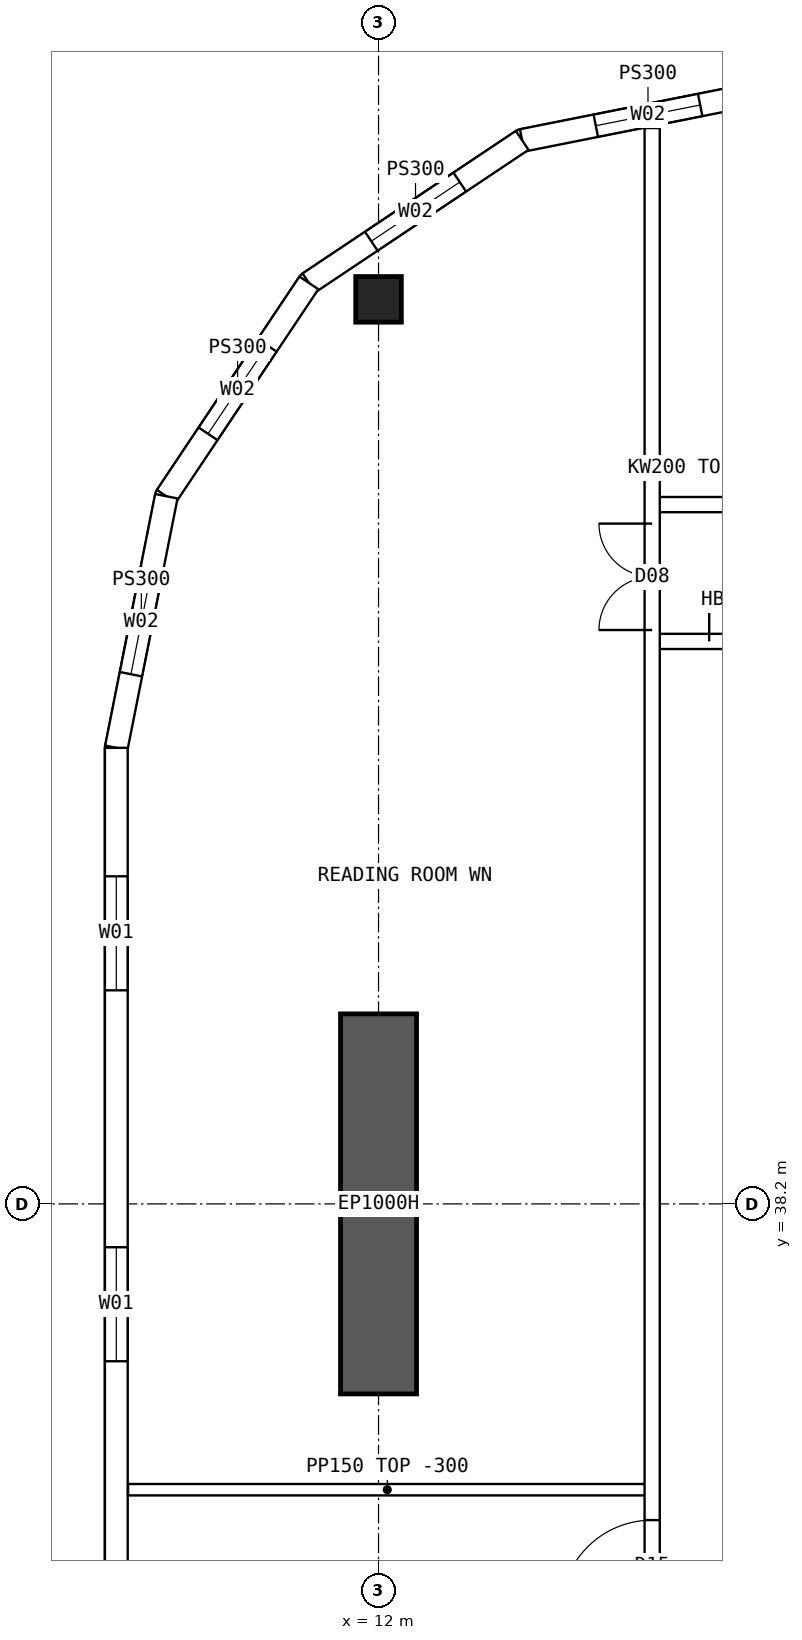
"""IFC4 building model, lengths in metres.
Left out: names, types, materials, properties, quantities, classifications, styles, units other than length and angle.
Written with IfcOpenShell. Run it as: python <this file> out.ifc"""

import sys

from ifc_helpers import new_model, si_unit, direction, frame, frame_2d, origin, origin_2d, place, context, subcontext, project, spatial, polyline, rectangle, hollow_rectangle, outline, extrude, element, fill, save


model = new_model("IFC4")
c1 = context("Model", 3, precision=1e-05, world=origin(), true_north=direction((0.0, 1.0)))
c2 = subcontext(c1, "Body", "Model", "MODEL_VIEW")
j1 = project(units=[si_unit("LENGTHUNIT", "METRE"), si_unit("PLANEANGLEUNIT", "RADIAN")], contexts=[c1])
p1 = place(None, origin())
s1 = spatial("IfcSite", under=j1, at=p1, CompositionType="ELEMENT")
p2 = place(p1, origin())
s2 = spatial("IfcBuilding", under=s1, at=p2, CompositionType="ELEMENT")
p3 = place(p2, frame((0.0, 0.0, 254.05)))
s3 = spatial("IfcBuildingStorey", under=s2, at=p3, CompositionType="ELEMENT", Elevation=254.05)
p4 = place(p3, frame((12.0, 50.1, 0.0), z_axis=(0.0, 0.0, 1.0), x_axis=(1.0, 0.0, 0.0)))
e1 = element("IfcColumn", 1, at=p4, inside=s3, PredefinedType="COLUMN", context=c2, shape_type="SweptSolid", body=[
    extrude(hollow_rectangle(XDim=0.6, YDim=0.6, WallThickness=0.06, at=origin_2d()), origin(), (0.0, 0.0, 1.0), 3.75),
])
p5 = place(p3, frame((12.0, 35.7, 0.0), z_axis=(0.0, 0.0, 1.0), x_axis=(0.0, 1.0, 0.0)))
e2 = element("IfcWall", 2, at=p5, inside=s3, PredefinedType="SHEAR", context=c2, shape_type="SweptSolid", body=[
    extrude(rectangle(XDim=5.0, YDim=1.0, at=frame_2d((2.5, 0.0))), origin(), (0.0, 0.0, 1.0), 3.75),
])
p6 = place(p3, frame((8.55, 44.2, 0.0), z_axis=(0.0, 0.0, 1.0), x_axis=(0.0, -1.0, 0.0)))
e3 = element("IfcWall", 3, at=p6, inside=s3, PredefinedType="SOLIDWALL", context=c2, shape_type="SweptSolid", body=[
    extrude(outline(polyline([(-0.015, -0.15), (24.415, -0.15), (24.385, 0.15), (0.015, 0.15), (-0.015, -0.15)])), origin(), (0.0, 0.0, 1.0), 3.45),
])
p7 = place(p6, frame((1.69, 0.0, 0.9)))
e4 = element("IfcOpeningElement", 4, at=p7, cuts=e3, PredefinedType="OPENING", context=c2, shape_type="SweptSolid", body=[
    extrude(rectangle(XDim=1.5, YDim=2.0, at=frame_2d((0.75, 1.0))), frame((0.0, 0.16, 0.0), z_axis=(0.0, -1.0, 0.0), x_axis=(1.0, 0.0, 0.0)), (0.0, 0.0, 1.0), 0.32),
])
p8 = place(p6, frame((6.57, 0.0, 0.9)))
e5 = element("IfcOpeningElement", 5, at=p8, cuts=e3, PredefinedType="OPENING", context=c2, shape_type="SweptSolid", body=[
    extrude(rectangle(XDim=1.5, YDim=2.0, at=frame_2d((0.75, 1.0))), frame((0.0, 0.16, 0.0), z_axis=(0.0, -1.0, 0.0), x_axis=(1.0, 0.0, 0.0)), (0.0, 0.0, 1.0), 0.32),
])
p9 = place(p6, frame((11.45, 0.0, 0.9)))
e6 = element("IfcOpeningElement", 6, at=p9, cuts=e3, PredefinedType="OPENING", context=c2, shape_type="SweptSolid", body=[
    extrude(rectangle(XDim=1.5, YDim=2.0, at=frame_2d((0.75, 1.0))), frame((0.0, 0.16, 0.0), z_axis=(0.0, -1.0, 0.0), x_axis=(1.0, 0.0, 0.0)), (0.0, 0.0, 1.0), 0.32),
])
p10 = place(p6, frame((16.33, 0.0, 0.9)))
e7 = element("IfcOpeningElement", 7, at=p10, cuts=e3, PredefinedType="OPENING", context=c2, shape_type="SweptSolid", body=[
    extrude(rectangle(XDim=1.5, YDim=2.0, at=frame_2d((0.75, 1.0))), frame((0.0, 0.16, 0.0), z_axis=(0.0, -1.0, 0.0), x_axis=(1.0, 0.0, 0.0)), (0.0, 0.0, 1.0), 0.32),
])
p11 = place(p6, frame((21.21, 0.0, 0.9)))
e8 = element("IfcOpeningElement", 8, at=p11, cuts=e3, PredefinedType="OPENING", context=c2, shape_type="SweptSolid", body=[
    extrude(rectangle(XDim=1.5, YDim=2.0, at=frame_2d((0.75, 1.0))), frame((0.0, 0.16, 0.0), z_axis=(0.0, -1.0, 0.0), x_axis=(1.0, 0.0, 0.0)), (0.0, 0.0, 1.0), 0.32),
])
p12 = place(p3, frame((17.2, 52.85, 0.0), z_axis=(0.0, 0.0, 1.0), x_axis=(-0.98078325777, -0.195100490205, 0.0)))
e9 = element("IfcWall", 9, at=p12, inside=s3, PredefinedType="SOLIDWALL", context=c2, shape_type="SweptSolid", body=[
    extrude(outline(polyline([(-0.03, -0.15), (3.405, -0.15), (3.345, 0.15), (0.03, 0.15), (-0.03, -0.15)])), origin(), (0.0, 0.0, 1.0), 3.45),
])
p13 = place(p12, frame((0.988, 0.0, 0.9)))
e10 = element("IfcOpeningElement", 10, at=p13, cuts=e9, PredefinedType="OPENING", context=c2, shape_type="SweptSolid", body=[
    extrude(rectangle(XDim=1.4, YDim=1.8, at=frame_2d((0.7, 0.9))), frame((0.0, 0.16, 0.0), z_axis=(0.0, -1.0, 0.0), x_axis=(1.0, 0.0, 0.0)), (0.0, 0.0, 1.0), 0.32),
])
p14 = place(p3, frame((13.89, 52.192, 0.0), z_axis=(0.0, 0.0, 1.0), x_axis=(-0.831460037396, -0.555584562613, 0.0)))
e11 = element("IfcWall", 11, at=p14, inside=s3, PredefinedType="SOLIDWALL", context=c2, shape_type="SweptSolid", body=[
    extrude(outline(polyline([(-0.03, -0.15), (3.405, -0.15), (3.345, 0.15), (0.03, 0.15), (-0.03, -0.15)])), origin(), (0.0, 0.0, 1.0), 3.45),
])
p15 = place(p14, frame((0.988, 0.0, 0.9)))
e12 = element("IfcOpeningElement", 12, at=p15, cuts=e11, PredefinedType="OPENING", context=c2, shape_type="SweptSolid", body=[
    extrude(rectangle(XDim=1.4, YDim=1.8, at=frame_2d((0.7, 0.9))), frame((0.0, 0.16, 0.0), z_axis=(0.0, -1.0, 0.0), x_axis=(1.0, 0.0, 0.0)), (0.0, 0.0, 1.0), 0.32),
])
p16 = place(p3, frame((11.083, 50.316, 0.0), z_axis=(0.0, 0.0, 1.0), x_axis=(-0.555567969291, -0.831471124873, 0.0)))
e13 = element("IfcWall", 13, at=p16, inside=s3, PredefinedType="SOLIDWALL", context=c2, shape_type="SweptSolid", body=[
    extrude(outline(polyline([(-0.03, -0.15), (3.405, -0.15), (3.345, 0.15), (0.03, 0.15), (-0.03, -0.15)])), origin(), (0.0, 0.0, 1.0), 3.45),
])
p17 = place(p16, frame((0.988, 0.0, 0.9)))
e14 = element("IfcOpeningElement", 14, at=p17, cuts=e13, PredefinedType="OPENING", context=c2, shape_type="SweptSolid", body=[
    extrude(rectangle(XDim=1.4, YDim=1.8, at=frame_2d((0.7, 0.9))), frame((0.0, 0.16, 0.0), z_axis=(0.0, -1.0, 0.0), x_axis=(1.0, 0.0, 0.0)), (0.0, 0.0, 1.0), 0.32),
])
p18 = place(p3, frame((9.208, 47.51, 0.0), z_axis=(0.0, 0.0, 1.0), x_axis=(-0.19508664885, -0.980786011034, 0.0)))
e15 = element("IfcWall", 15, at=p18, inside=s3, PredefinedType="SOLIDWALL", context=c2, shape_type="SweptSolid", body=[
    extrude(outline(polyline([(-0.03, -0.15), (3.39, -0.15), (3.36, 0.15), (0.03, 0.15), (-0.03, -0.15)])), origin(), (0.0, 0.0, 1.0), 3.45),
])
p19 = place(p18, frame((0.988, 0.0, 0.9)))
e16 = element("IfcOpeningElement", 16, at=p19, cuts=e15, PredefinedType="OPENING", context=c2, shape_type="SweptSolid", body=[
    extrude(rectangle(XDim=1.4, YDim=1.8, at=frame_2d((0.7, 0.9))), frame((0.0, 0.16, 0.0), z_axis=(0.0, -1.0, 0.0), x_axis=(1.0, 0.0, 0.0)), (0.0, 0.0, 1.0), 0.32),
])
p20 = place(p3, frame((15.6, 47.4, 0.0), z_axis=(0.0, 0.0, 1.0), x_axis=(1.0, 0.0, 0.0)))
e17 = element("IfcWall", 17, at=p20, inside=s3, PredefinedType="SOLIDWALL", context=c2, shape_type="SweptSolid", body=[
    extrude(rectangle(XDim=2.05, YDim=0.2, at=frame_2d((1.025, 0.0))), origin(), (0.0, 0.0, 1.0), 3.45),
])
p21 = place(p20, frame((0.95, 0.0, 0.0)))
e18 = element("IfcOpeningElement", 18, at=p21, cuts=e17, PredefinedType="OPENING", context=c2, shape_type="SweptSolid", body=[
    extrude(rectangle(XDim=0.9, YDim=2.1, at=frame_2d((0.45, 1.05))), frame((0.0, 0.11, 0.0), z_axis=(0.0, -1.0, 0.0), x_axis=(1.0, 0.0, 0.0)), (0.0, 0.0, 1.0), 0.22),
])
p22 = place(p3, frame((15.6, 45.6, 0.0), z_axis=(0.0, 0.0, 1.0), x_axis=(1.0, 0.0, 0.0)))
e19 = element("IfcWall", 19, at=p22, inside=s3, PredefinedType="SOLIDWALL", context=c2, shape_type="SweptSolid", body=[
    extrude(rectangle(XDim=2.05, YDim=0.2, at=frame_2d((1.025, 0.0))), origin(), (0.0, 0.0, 1.0), 3.45),
])
p23 = place(p22, frame((0.75, 0.0, 0.0)))
e20 = element("IfcOpeningElement", 20, at=p23, cuts=e19, PredefinedType="OPENING", context=c2, shape_type="SweptSolid", body=[
    extrude(rectangle(XDim=1.2, YDim=2.1, at=frame_2d((0.6, 1.05))), frame((0.0, 0.11, 0.0), z_axis=(0.0, -1.0, 0.0), x_axis=(1.0, 0.0, 0.0)), (0.0, 0.0, 1.0), 0.22),
])
p24 = place(p3, frame((15.6, 11.646, 0.0), z_axis=(0.0, 0.0, 1.0), x_axis=(0.0, 1.0, 0.0)))
e21 = element("IfcWall", 21, at=p24, inside=s3, PredefinedType="SOLIDWALL", context=c2, shape_type="SweptSolid", body=[
    extrude(rectangle(XDim=40.708, YDim=0.2, at=frame_2d((20.354, 0.0))), origin(), (0.0, 0.0, 1.0), 3.45),
])
p25 = place(p24, frame((21.194, 0.0, 0.0)))
e22 = element("IfcOpeningElement", 22, at=p25, cuts=e21, PredefinedType="OPENING", context=c2, shape_type="SweptSolid", body=[
    extrude(rectangle(XDim=1.2, YDim=2.1, at=frame_2d((0.6, 1.05))), frame((0.0, 0.11, 0.0), z_axis=(0.0, -1.0, 0.0), x_axis=(1.0, 0.0, 0.0)), (0.0, 0.0, 1.0), 0.22),
])
p26 = place(p24, frame((5.104, 0.0, 0.0)))
e23 = element("IfcOpeningElement", 23, at=p26, cuts=e21, PredefinedType="OPENING", context=c2, shape_type="SweptSolid", body=[
    extrude(rectangle(XDim=1.4, YDim=2.1, at=frame_2d((0.7, 1.05))), frame((0.0, 0.11, 0.0), z_axis=(0.0, -1.0, 0.0), x_axis=(1.0, 0.0, 0.0)), (0.0, 0.0, 1.0), 0.22),
])
p27 = place(p24, frame((34.104, 0.0, 0.0)))
e24 = element("IfcOpeningElement", 24, at=p27, cuts=e21, PredefinedType="OPENING", context=c2, shape_type="SweptSolid", body=[
    extrude(rectangle(XDim=1.4, YDim=2.1, at=frame_2d((0.7, 1.05))), frame((0.0, 0.11, 0.0), z_axis=(0.0, -1.0, 0.0), x_axis=(1.0, 0.0, 0.0)), (0.0, 0.0, 1.0), 0.22),
])
p28 = place(p3, frame((8.705, 34.44, 0.0), z_axis=(0.0, 0.0, 1.0), x_axis=(1.0, 0.0, 0.0)))
e25 = element("IfcWall", 25, at=p28, inside=s3, PredefinedType="PARTITIONING", context=c2, shape_type="SweptSolid", body=[
    extrude(outline(polyline([(0.0, 0.0), (6.82, 0.0), (6.82, 3.45), (3.597, 3.45), (3.595, 3.0), (2.997, 3.0), (2.995, 3.45), (0.0, 3.45), (0.0, 0.0)])), frame((0.0, 0.075, 0.0), z_axis=(0.0, -1.0, 0.0), x_axis=(1.0, 0.0, 0.0)), (0.0, 0.0, 1.0), 0.15),
])
p29 = place(p7, origin())
e26 = element("IfcWindow", 26, at=p29, inside=s3, PartitioningType="SINGLE_PANEL", PredefinedType="WINDOW", context=c2, shape_type="SweptSolid", body=[
    extrude(rectangle(XDim=1.5, YDim=2.0, at=frame_2d((0.75, 1.0))), frame((0.0, 0.03, 0.0), z_axis=(0.0, -1.0, 0.0), x_axis=(1.0, 0.0, 0.0)), (0.0, 0.0, 1.0), 0.06),
])
fill(e4, e26)
p30 = place(p8, origin())
e27 = element("IfcWindow", 27, at=p30, inside=s3, PartitioningType="SINGLE_PANEL", PredefinedType="WINDOW", context=c2, shape_type="SweptSolid", body=[
    extrude(rectangle(XDim=1.5, YDim=2.0, at=frame_2d((0.75, 1.0))), frame((0.0, 0.03, 0.0), z_axis=(0.0, -1.0, 0.0), x_axis=(1.0, 0.0, 0.0)), (0.0, 0.0, 1.0), 0.06),
])
fill(e5, e27)
p31 = place(p13, origin())
e28 = element("IfcWindow", 28, at=p31, inside=s3, PartitioningType="SINGLE_PANEL", PredefinedType="WINDOW", context=c2, shape_type="SweptSolid", body=[
    extrude(rectangle(XDim=1.4, YDim=1.8, at=frame_2d((0.7, 0.9))), frame((0.0, 0.03, 0.0), z_axis=(0.0, -1.0, 0.0), x_axis=(1.0, 0.0, 0.0)), (0.0, 0.0, 1.0), 0.06),
])
fill(e10, e28)
p32 = place(p15, origin())
e29 = element("IfcWindow", 29, at=p32, inside=s3, PartitioningType="SINGLE_PANEL", PredefinedType="WINDOW", context=c2, shape_type="SweptSolid", body=[
    extrude(rectangle(XDim=1.4, YDim=1.8, at=frame_2d((0.7, 0.9))), frame((0.0, 0.03, 0.0), z_axis=(0.0, -1.0, 0.0), x_axis=(1.0, 0.0, 0.0)), (0.0, 0.0, 1.0), 0.06),
])
fill(e12, e29)
p33 = place(p17, origin())
e30 = element("IfcWindow", 30, at=p33, inside=s3, PartitioningType="SINGLE_PANEL", PredefinedType="WINDOW", context=c2, shape_type="SweptSolid", body=[
    extrude(rectangle(XDim=1.4, YDim=1.8, at=frame_2d((0.7, 0.9))), frame((0.0, 0.03, 0.0), z_axis=(0.0, -1.0, 0.0), x_axis=(1.0, 0.0, 0.0)), (0.0, 0.0, 1.0), 0.06),
])
fill(e14, e30)
p34 = place(p19, origin())
e31 = element("IfcWindow", 31, at=p34, inside=s3, PartitioningType="SINGLE_PANEL", PredefinedType="WINDOW", context=c2, shape_type="SweptSolid", body=[
    extrude(rectangle(XDim=1.4, YDim=1.8, at=frame_2d((0.7, 0.9))), frame((0.0, 0.03, 0.0), z_axis=(0.0, -1.0, 0.0), x_axis=(1.0, 0.0, 0.0)), (0.0, 0.0, 1.0), 0.06),
])
fill(e16, e31)
p35 = place(p23, origin())
e32 = element("IfcDoor", 32, at=p35, inside=s3, OperationType="DOUBLE_DOOR_SINGLE_SWING", PredefinedType="DOOR", context=c2, shape_type="SweptSolid", body=[
    extrude(rectangle(XDim=1.2, YDim=2.1, at=frame_2d((0.6, 1.05))), frame((0.0, 0.025, 0.0), z_axis=(0.0, -1.0, 0.0), x_axis=(1.0, 0.0, 0.0)), (0.0, 0.0, 1.0), 0.05),
])
fill(e20, e32)
p36 = place(p25, origin())
e33 = element("IfcDoor", 33, at=p36, inside=s3, OperationType="SINGLE_SWING_LEFT", PredefinedType="DOOR", context=c2, shape_type="SweptSolid", body=[
    extrude(rectangle(XDim=1.2, YDim=2.1, at=frame_2d((0.6, 1.05))), frame((0.0, 0.025, 0.0), z_axis=(0.0, -1.0, 0.0), x_axis=(1.0, 0.0, 0.0)), (0.0, 0.0, 1.0), 0.05),
])
fill(e22, e33)
p37 = place(p27, origin())
e34 = element("IfcDoor", 34, at=p37, inside=s3, OperationType="DOUBLE_DOOR_SINGLE_SWING", PredefinedType="DOOR", context=c2, shape_type="SweptSolid", body=[
    extrude(rectangle(XDim=1.4, YDim=2.1, at=frame_2d((0.7, 1.05))), frame((0.0, 0.025, 0.0), z_axis=(0.0, -1.0, 0.0), x_axis=(1.0, 0.0, 0.0)), (0.0, 0.0, 1.0), 0.05),
])
fill(e24, e34)
save(model, sys.argv[1])
